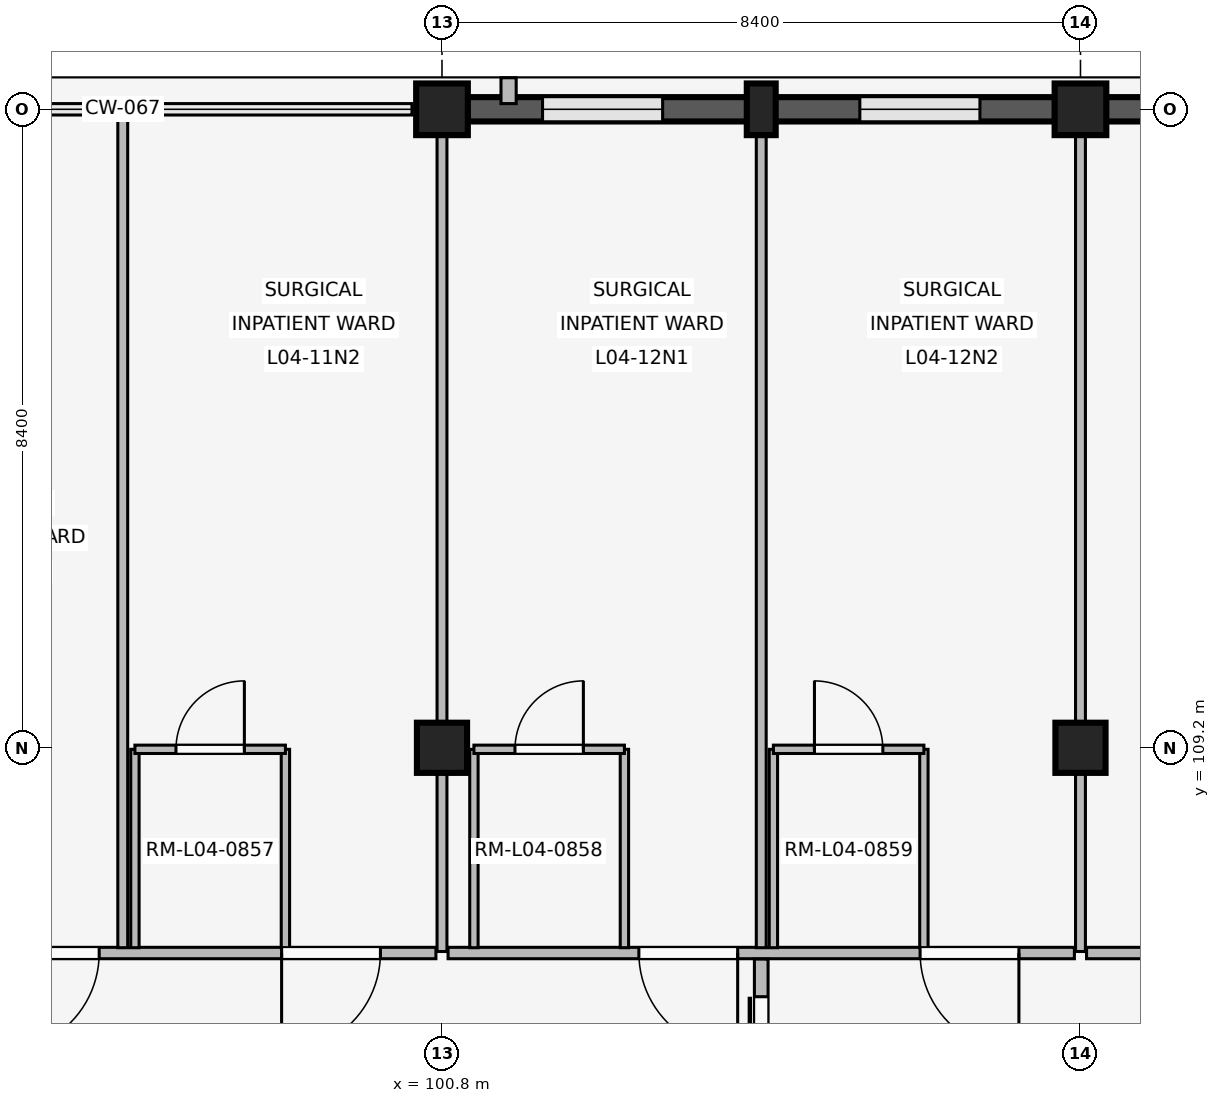
"""IFC4 building model, lengths in metres.
Left out: names, types, materials, properties, quantities, classifications, styles, units other than length and angle.
Written with IfcOpenShell. Run it as: python <this file> out.ifc"""

import sys

from ifc_helpers import new_model, si_unit, direction, frame, frame_2d, origin, origin_2d, place, context, subcontext, project, spatial, rectangle, extrude, element, fill, save


model = new_model("IFC4")
c1 = context("Model", 3, precision=1e-05, world=origin(), true_north=direction((0.0, 1.0)))
c2 = subcontext(c1, "Body", "Model", "MODEL_VIEW")
j1 = project(units=[si_unit("LENGTHUNIT", "METRE"), si_unit("PLANEANGLEUNIT", "RADIAN")], contexts=[c1])
p1 = place(None, origin())
s1 = spatial("IfcSite", under=j1, at=p1, CompositionType="ELEMENT")
p2 = place(p1, origin())
s2 = spatial("IfcBuilding", under=s1, at=p2, CompositionType="ELEMENT")
p3 = place(p2, frame((0.0, 0.0, 16.2)))
s3 = spatial("IfcBuildingStorey", under=s2, at=p3, CompositionType="ELEMENT", Elevation=16.2)
p4 = place(p3, frame((100.8, 109.2, 0.0), z_axis=(0.0, 0.0, 1.0), x_axis=(1.0, 0.0, 0.0)))
e1 = element("IfcColumn", 1, at=p4, inside=s3, PredefinedType="COLUMN", context=c2, shape_type="SweptSolid", body=[
    extrude(rectangle(XDim=0.66, YDim=0.66, at=origin_2d()), origin(), (0.0, 0.0, 1.0), 4.2),
])
p5 = place(p3, frame((100.8, 117.6, 0.0), z_axis=(0.0, 0.0, 1.0), x_axis=(1.0, 0.0, 0.0)))
e2 = element("IfcColumn", 2, at=p5, inside=s3, PredefinedType="COLUMN", context=c2, shape_type="SweptSolid", body=[
    extrude(rectangle(XDim=0.68, YDim=0.68, at=origin_2d()), origin(), (0.0, 0.0, 1.0), 4.2),
])
p6 = place(p3, frame((109.2, 109.2, 0.0), z_axis=(0.0, 0.0, 1.0), x_axis=(1.0, 0.0, 0.0)))
e3 = element("IfcColumn", 3, at=p6, inside=s3, PredefinedType="COLUMN", context=c2, shape_type="SweptSolid", body=[
    extrude(rectangle(XDim=0.66, YDim=0.66, at=origin_2d()), origin(), (0.0, 0.0, 1.0), 4.2),
])
p7 = place(p3, frame((109.2, 117.6, 0.0), z_axis=(0.0, 0.0, 1.0), x_axis=(1.0, 0.0, 0.0)))
e4 = element("IfcColumn", 4, at=p7, inside=s3, PredefinedType="COLUMN", context=c2, shape_type="SweptSolid", body=[
    extrude(rectangle(XDim=0.68, YDim=0.68, at=origin_2d()), origin(), (0.0, 0.0, 1.0), 4.2),
])
p8 = place(p3, frame((105.0, 117.6, 0.0), z_axis=(0.0, 0.0, 1.0), x_axis=(1.0, 0.0, 0.0)))
e5 = element("IfcColumn", 5, at=p8, inside=s3, PredefinedType="PILASTER", context=c2, shape_type="SweptSolid", body=[
    extrude(rectangle(XDim=0.38, YDim=0.68, at=origin_2d()), origin(), (0.0, 0.0, 1.0), 4.2),
])
p9 = place(p3, frame((101.135, 117.6, 0.0), z_axis=(0.0, 0.0, 1.0), x_axis=(1.0, 0.0, 0.0)))
e6 = element("IfcWall", 6, at=p9, inside=s3, PredefinedType="SOLIDWALL", context=c2, shape_type="SweptSolid", body=[
    extrude(rectangle(XDim=7.73, YDim=0.32, at=frame_2d((3.865, 0.0))), origin(), (0.0, 0.0, 1.0), 3.32),
])
p10 = place(p9, frame((0.988, 0.0, 0.85)))
e7 = element("IfcOpeningElement", 7, at=p10, cuts=e6, PredefinedType="OPENING", context=c2, shape_type="SweptSolid", body=[
    extrude(rectangle(XDim=1.58, YDim=1.7, at=frame_2d((0.79, 0.85))), frame((0.0, 0.17, 0.0), z_axis=(0.0, -1.0, 0.0), x_axis=(1.0, 0.0, 0.0)), (0.0, 0.0, 1.0), 0.34),
])
p11 = place(p9, frame((5.162, 0.0, 0.85)))
e8 = element("IfcOpeningElement", 8, at=p11, cuts=e6, PredefinedType="OPENING", context=c2, shape_type="SweptSolid", body=[
    extrude(rectangle(XDim=1.58, YDim=1.7, at=frame_2d((0.79, 0.85))), frame((0.0, 0.17, 0.0), z_axis=(0.0, -1.0, 0.0), x_axis=(1.0, 0.0, 0.0)), (0.0, 0.0, 1.0), 0.34),
])
p12 = place(p3, frame((101.676, 117.675, 0.0), z_axis=(0.0, 0.0, 1.0), x_axis=(0.0, 1.0, 0.0)))
e9 = element("IfcWall", 9, at=p12, inside=s3, PredefinedType="ELEMENTEDWALL", context=c2, shape_type="SweptSolid", body=[
    extrude(rectangle(XDim=0.34, YDim=0.2, at=frame_2d((0.17, 0.0))), origin(), (0.0, 0.0, 1.0), 3.3),
])
p13 = place(p3, frame((109.535, 117.6, 0.0), z_axis=(0.0, 0.0, 1.0), x_axis=(1.0, 0.0, 0.0)))
e10 = element("IfcWall", 10, at=p13, inside=s3, PredefinedType="SOLIDWALL", context=c2, shape_type="SweptSolid", body=[
    extrude(rectangle(XDim=7.73, YDim=0.32, at=frame_2d((3.865, 0.0))), origin(), (0.0, 0.0, 1.0), 3.32),
])
p14 = place(p13, frame((1.038, 0.0, 0.85)))
e11 = element("IfcOpeningElement", 11, at=p14, cuts=e10, PredefinedType="OPENING", context=c2, shape_type="SweptSolid", body=[
    extrude(rectangle(XDim=1.48, YDim=1.6, at=frame_2d((0.74, 0.8))), frame((0.0, 0.17, 0.0), z_axis=(0.0, -1.0, 0.0), x_axis=(1.0, 0.0, 0.0)), (0.0, 0.0, 1.0), 0.34),
])
p15 = place(p13, frame((5.212, 0.0, 0.85)))
e12 = element("IfcOpeningElement", 12, at=p15, cuts=e10, PredefinedType="OPENING", context=c2, shape_type="SweptSolid", body=[
    extrude(rectangle(XDim=1.48, YDim=1.6, at=frame_2d((0.74, 0.8))), frame((0.0, 0.17, 0.0), z_axis=(0.0, -1.0, 0.0), x_axis=(1.0, 0.0, 0.0)), (0.0, 0.0, 1.0), 0.34),
])
p16 = place(p3, frame((100.72, 106.5, 0.0), z_axis=(0.0, 0.0, 1.0), x_axis=(-1.0, 0.0, 0.0)))
e13 = element("IfcWall", 13, at=p16, inside=s3, PredefinedType="PARTITIONING", context=c2, shape_type="SweptSolid", body=[
    extrude(rectangle(XDim=7.96, YDim=0.15, at=frame_2d((3.98, 0.0))), origin(), (0.0, 0.0, 1.0), 3.3),
])
p17 = place(p16, frame((0.73, 0.0, 0.0)))
e14 = element("IfcOpeningElement", 14, at=p17, cuts=e13, PredefinedType="OPENING", context=c2, shape_type="SweptSolid", body=[
    extrude(rectangle(XDim=1.3, YDim=2.25, at=frame_2d((0.65, 1.125))), frame((0.0, 0.085, 0.0), z_axis=(0.0, -1.0, 0.0), x_axis=(1.0, 0.0, 0.0)), (0.0, 0.0, 1.0), 0.17),
])
p18 = place(p16, frame((4.43, 0.0, 0.0)))
e15 = element("IfcOpeningElement", 15, at=p18, cuts=e13, PredefinedType="OPENING", context=c2, shape_type="SweptSolid", body=[
    extrude(rectangle(XDim=1.3, YDim=2.25, at=frame_2d((0.65, 1.125))), frame((0.0, 0.085, 0.0), z_axis=(0.0, -1.0, 0.0), x_axis=(1.0, 0.0, 0.0)), (0.0, 0.0, 1.0), 0.17),
])
p19 = place(p3, frame((96.6, 106.57, 0.0), z_axis=(0.0, 0.0, 1.0), x_axis=(0.0, 1.0, 0.0)))
e16 = element("IfcWall", 16, at=p19, inside=s3, PredefinedType="PARTITIONING", context=c2, shape_type="SweptSolid", body=[
    extrude(rectangle(XDim=10.93, YDim=0.13, at=frame_2d((5.465, 0.0))), origin(), (0.0, 0.0, 1.0), 3.3),
])
for number, where, z_axis, x_axis in (
    (17, (96.76, 106.57, 0.0), (0.0, 0.0, 1.0), (0.0, 1.0, 0.0)),
    (18, (98.74, 106.57, 0.0), (0.0, 0.0, 1.0), (0.0, 1.0, 0.0)),
):
    element("IfcWall", number, at=place(p3, frame(where, z_axis=z_axis, x_axis=x_axis)), inside=s3, PredefinedType="PARTITIONING", context=c2, shape_type="SweptSolid", body=[
        extrude(rectangle(XDim=2.61, YDim=0.11, at=frame_2d((1.305, 0.0))), origin(), (0.0, 0.0, 1.0), 3.3),
    ])
p20 = place(p3, frame((96.76, 109.18, 0.0), z_axis=(0.0, 0.0, 1.0), x_axis=(1.0, 0.0, 0.0)))
e19 = element("IfcWall", 19, at=p20, inside=s3, PredefinedType="PARTITIONING", context=c2, shape_type="SweptSolid", body=[
    extrude(rectangle(XDim=1.98, YDim=0.11, at=frame_2d((0.99, 0.0))), origin(), (0.0, 0.0, 1.0), 3.3),
])
p21 = place(p20, frame((0.54, 0.0, 0.0)))
e20 = element("IfcOpeningElement", 20, at=p21, cuts=e19, PredefinedType="OPENING", context=c2, shape_type="SweptSolid", body=[
    extrude(rectangle(XDim=0.9, YDim=2.1, at=frame_2d((0.45, 1.05))), frame((0.0, 0.065, 0.0), z_axis=(0.0, -1.0, 0.0), x_axis=(1.0, 0.0, 0.0)), (0.0, 0.0, 1.0), 0.13),
])
p22 = place(p3, frame((100.8, 106.52, 0.0), z_axis=(0.0, 0.0, 1.0), x_axis=(0.0, 1.0, 0.0)))
e21 = element("IfcWall", 21, at=p22, inside=s3, PredefinedType="PARTITIONING", context=c2, shape_type="SweptSolid", body=[
    extrude(rectangle(XDim=10.94, YDim=0.13, at=frame_2d((5.47, 0.0))), origin(), (0.0, 0.0, 1.0), 3.3),
])
p23 = place(p3, frame((109.12, 106.5, 0.0), z_axis=(0.0, 0.0, 1.0), x_axis=(-1.0, 0.0, 0.0)))
e22 = element("IfcWall", 22, at=p23, inside=s3, PredefinedType="PARTITIONING", context=c2, shape_type="SweptSolid", body=[
    extrude(rectangle(XDim=8.24, YDim=0.15, at=frame_2d((4.12, 0.0))), origin(), (0.0, 0.0, 1.0), 3.3),
])
p24 = place(p23, frame((0.73, 0.0, 0.0)))
e23 = element("IfcOpeningElement", 23, at=p24, cuts=e22, PredefinedType="OPENING", context=c2, shape_type="SweptSolid", body=[
    extrude(rectangle(XDim=1.3, YDim=2.25, at=frame_2d((0.65, 1.125))), frame((0.0, 0.085, 0.0), z_axis=(0.0, -1.0, 0.0), x_axis=(1.0, 0.0, 0.0)), (0.0, 0.0, 1.0), 0.17),
])
p25 = place(p23, frame((4.43, 0.0, 0.0)))
e24 = element("IfcOpeningElement", 24, at=p25, cuts=e22, PredefinedType="OPENING", context=c2, shape_type="SweptSolid", body=[
    extrude(rectangle(XDim=1.3, YDim=2.25, at=frame_2d((0.65, 1.125))), frame((0.0, 0.085, 0.0), z_axis=(0.0, -1.0, 0.0), x_axis=(1.0, 0.0, 0.0)), (0.0, 0.0, 1.0), 0.17),
])
p26 = place(p3, frame((105.0, 106.57, 0.0), z_axis=(0.0, 0.0, 1.0), x_axis=(0.0, 1.0, 0.0)))
e25 = element("IfcWall", 25, at=p26, inside=s3, PredefinedType="PARTITIONING", context=c2, shape_type="SweptSolid", body=[
    extrude(rectangle(XDim=10.93, YDim=0.13, at=frame_2d((5.465, 0.0))), origin(), (0.0, 0.0, 1.0), 3.3),
])
for number, where, z_axis, x_axis in (
    (26, (101.22, 106.57, 0.0), (0.0, 0.0, 1.0), (0.0, 1.0, 0.0)),
    (27, (103.2, 106.57, 0.0), (0.0, 0.0, 1.0), (0.0, 1.0, 0.0)),
):
    element("IfcWall", number, at=place(p3, frame(where, z_axis=z_axis, x_axis=x_axis)), inside=s3, PredefinedType="PARTITIONING", context=c2, shape_type="SweptSolid", body=[
        extrude(rectangle(XDim=2.61, YDim=0.11, at=frame_2d((1.305, 0.0))), origin(), (0.0, 0.0, 1.0), 3.3),
    ])
p27 = place(p3, frame((101.22, 109.18, 0.0), z_axis=(0.0, 0.0, 1.0), x_axis=(1.0, 0.0, 0.0)))
e28 = element("IfcWall", 28, at=p27, inside=s3, PredefinedType="PARTITIONING", context=c2, shape_type="SweptSolid", body=[
    extrude(rectangle(XDim=1.98, YDim=0.11, at=frame_2d((0.99, 0.0))), origin(), (0.0, 0.0, 1.0), 3.3),
])
p28 = place(p27, frame((0.54, 0.0, 0.0)))
e29 = element("IfcOpeningElement", 29, at=p28, cuts=e28, PredefinedType="OPENING", context=c2, shape_type="SweptSolid", body=[
    extrude(rectangle(XDim=0.9, YDim=2.1, at=frame_2d((0.45, 1.05))), frame((0.0, 0.065, 0.0), z_axis=(0.0, -1.0, 0.0), x_axis=(1.0, 0.0, 0.0)), (0.0, 0.0, 1.0), 0.13),
])
for number, where, z_axis, x_axis in (
    (30, (105.16, 106.57, 0.0), (0.0, 0.0, 1.0), (0.0, 1.0, 0.0)),
    (31, (107.14, 106.57, 0.0), (0.0, 0.0, 1.0), (0.0, 1.0, 0.0)),
):
    element("IfcWall", number, at=place(p3, frame(where, z_axis=z_axis, x_axis=x_axis)), inside=s3, PredefinedType="PARTITIONING", context=c2, shape_type="SweptSolid", body=[
        extrude(rectangle(XDim=2.61, YDim=0.11, at=frame_2d((1.305, 0.0))), origin(), (0.0, 0.0, 1.0), 3.3),
    ])
p29 = place(p3, frame((105.16, 109.18, 0.0), z_axis=(0.0, 0.0, 1.0), x_axis=(1.0, 0.0, 0.0)))
e32 = element("IfcWall", 32, at=p29, inside=s3, PredefinedType="PARTITIONING", context=c2, shape_type="SweptSolid", body=[
    extrude(rectangle(XDim=1.98, YDim=0.11, at=frame_2d((0.99, 0.0))), origin(), (0.0, 0.0, 1.0), 3.3),
])
p30 = place(p29, frame((0.54, 0.0, 0.0)))
e33 = element("IfcOpeningElement", 33, at=p30, cuts=e32, PredefinedType="OPENING", context=c2, shape_type="SweptSolid", body=[
    extrude(rectangle(XDim=0.9, YDim=2.1, at=frame_2d((0.45, 1.05))), frame((0.0, 0.065, 0.0), z_axis=(0.0, -1.0, 0.0), x_axis=(1.0, 0.0, 0.0)), (0.0, 0.0, 1.0), 0.13),
])
p31 = place(p3, frame((105.0, 103.58, 0.0), z_axis=(0.0, 0.0, 1.0), x_axis=(0.0, 1.0, 0.0)))
e34 = element("IfcWall", 34, at=p31, inside=s3, PredefinedType="PARTITIONING", context=c2, shape_type="SweptSolid", body=[
    extrude(rectangle(XDim=2.84, YDim=0.18, at=frame_2d((1.42, 0.0))), origin(), (0.0, 0.0, 1.0), 3.3),
])
p32 = place(p31, frame((0.495, 0.0, 0.0)))
e35 = element("IfcOpeningElement", 35, at=p32, cuts=e34, PredefinedType="OPENING", context=c2, shape_type="SweptSolid", body=[
    extrude(rectangle(XDim=1.85, YDim=2.3, at=frame_2d((0.925, 1.15))), frame((0.0, 0.1, 0.0), z_axis=(0.0, -1.0, 0.0), x_axis=(1.0, 0.0, 0.0)), (0.0, 0.0, 1.0), 0.2),
])
p33 = place(p3, frame((109.2, 106.52, 0.0), z_axis=(0.0, 0.0, 1.0), x_axis=(0.0, 1.0, 0.0)))
e36 = element("IfcWall", 36, at=p33, inside=s3, PredefinedType="PARTITIONING", context=c2, shape_type="SweptSolid", body=[
    extrude(rectangle(XDim=10.94, YDim=0.13, at=frame_2d((5.47, 0.0))), origin(), (0.0, 0.0, 1.0), 3.3),
])
p34 = place(p3, frame((117.52, 106.5, 0.0), z_axis=(0.0, 0.0, 1.0), x_axis=(-1.0, 0.0, 0.0)))
e37 = element("IfcWall", 37, at=p34, inside=s3, PredefinedType="PARTITIONING", context=c2, shape_type="SweptSolid", body=[
    extrude(rectangle(XDim=8.24, YDim=0.15, at=frame_2d((4.12, 0.0))), origin(), (0.0, 0.0, 1.0), 3.3),
])
p35 = place(p34, frame((3.495, 0.0, 0.0)))
e38 = element("IfcOpeningElement", 38, at=p35, cuts=e37, PredefinedType="OPENING", context=c2, shape_type="SweptSolid", body=[
    extrude(rectangle(XDim=1.25, YDim=2.2, at=frame_2d((0.625, 1.1))), frame((0.0, 0.085, 0.0), z_axis=(0.0, -1.0, 0.0), x_axis=(1.0, 0.0, 0.0)), (0.0, 0.0, 1.0), 0.17),
])
p36 = place(p10, origin())
e39 = element("IfcWindow", 39, at=p36, inside=s3, PartitioningType="SINGLE_PANEL", PredefinedType="WINDOW", context=c2, shape_type="SweptSolid", body=[
    extrude(rectangle(XDim=1.58, YDim=1.7, at=frame_2d((0.79, 0.85))), frame((0.0, 0.03, 0.0), z_axis=(0.0, -1.0, 0.0), x_axis=(1.0, 0.0, 0.0)), (0.0, 0.0, 1.0), 0.06),
])
fill(e7, e39)
p37 = place(p11, origin())
e40 = element("IfcWindow", 40, at=p37, inside=s3, PartitioningType="SINGLE_PANEL", PredefinedType="WINDOW", context=c2, shape_type="SweptSolid", body=[
    extrude(rectangle(XDim=1.58, YDim=1.7, at=frame_2d((0.79, 0.85))), frame((0.0, 0.03, 0.0), z_axis=(0.0, -1.0, 0.0), x_axis=(1.0, 0.0, 0.0)), (0.0, 0.0, 1.0), 0.06),
])
fill(e8, e40)
p38 = place(p17, origin())
e41 = element("IfcDoor", 41, at=p38, inside=s3, OperationType="SINGLE_SWING_RIGHT", PredefinedType="DOOR", context=c2, shape_type="SweptSolid", body=[
    extrude(rectangle(XDim=1.3, YDim=2.25, at=frame_2d((0.65, 1.125))), frame((0.0, 0.025, 0.0), z_axis=(0.0, -1.0, 0.0), x_axis=(1.0, 0.0, 0.0)), (0.0, 0.0, 1.0), 0.05),
])
fill(e14, e41)
p39 = place(p18, origin())
e42 = element("IfcDoor", 42, at=p39, inside=s3, OperationType="SINGLE_SWING_RIGHT", PredefinedType="DOOR", context=c2, shape_type="SweptSolid", body=[
    extrude(rectangle(XDim=1.3, YDim=2.25, at=frame_2d((0.65, 1.125))), frame((0.0, 0.025, 0.0), z_axis=(0.0, -1.0, 0.0), x_axis=(1.0, 0.0, 0.0)), (0.0, 0.0, 1.0), 0.05),
])
fill(e15, e42)
p40 = place(p21, origin())
e43 = element("IfcDoor", 43, at=p40, inside=s3, OperationType="SINGLE_SWING_RIGHT", PredefinedType="DOOR", context=c2, shape_type="SweptSolid", body=[
    extrude(rectangle(XDim=0.9, YDim=2.1, at=frame_2d((0.45, 1.05))), frame((0.0, 0.025, 0.0), z_axis=(0.0, -1.0, 0.0), x_axis=(1.0, 0.0, 0.0)), (0.0, 0.0, 1.0), 0.05),
])
fill(e20, e43)
p41 = place(p24, origin())
e44 = element("IfcDoor", 44, at=p41, inside=s3, OperationType="SINGLE_SWING_LEFT", PredefinedType="DOOR", context=c2, shape_type="SweptSolid", body=[
    extrude(rectangle(XDim=1.3, YDim=2.25, at=frame_2d((0.65, 1.125))), frame((0.0, 0.025, 0.0), z_axis=(0.0, -1.0, 0.0), x_axis=(1.0, 0.0, 0.0)), (0.0, 0.0, 1.0), 0.05),
])
fill(e23, e44)
p42 = place(p25, origin())
e45 = element("IfcDoor", 45, at=p42, inside=s3, OperationType="SINGLE_SWING_LEFT", PredefinedType="DOOR", context=c2, shape_type="SweptSolid", body=[
    extrude(rectangle(XDim=1.3, YDim=2.25, at=frame_2d((0.65, 1.125))), frame((0.0, 0.025, 0.0), z_axis=(0.0, -1.0, 0.0), x_axis=(1.0, 0.0, 0.0)), (0.0, 0.0, 1.0), 0.05),
])
fill(e24, e45)
p43 = place(p28, origin())
e46 = element("IfcDoor", 46, at=p43, inside=s3, OperationType="SINGLE_SWING_RIGHT", PredefinedType="DOOR", context=c2, shape_type="SweptSolid", body=[
    extrude(rectangle(XDim=0.9, YDim=2.1, at=frame_2d((0.45, 1.05))), frame((0.0, 0.025, 0.0), z_axis=(0.0, -1.0, 0.0), x_axis=(1.0, 0.0, 0.0)), (0.0, 0.0, 1.0), 0.05),
])
fill(e29, e46)
p44 = place(p30, origin())
e47 = element("IfcDoor", 47, at=p44, inside=s3, OperationType="SINGLE_SWING_LEFT", PredefinedType="DOOR", context=c2, shape_type="SweptSolid", body=[
    extrude(rectangle(XDim=0.9, YDim=2.1, at=frame_2d((0.45, 1.05))), frame((0.0, 0.025, 0.0), z_axis=(0.0, -1.0, 0.0), x_axis=(1.0, 0.0, 0.0)), (0.0, 0.0, 1.0), 0.05),
])
fill(e33, e47)
p45 = place(p32, origin())
e48 = element("IfcDoor", 48, at=p45, inside=s3, OperationType="SLIDING_TO_LEFT", PredefinedType="DOOR", context=c2, shape_type="SweptSolid", body=[
    extrude(rectangle(XDim=1.85, YDim=2.3, at=frame_2d((0.925, 1.15))), frame((0.0, 0.025, 0.0), z_axis=(0.0, -1.0, 0.0), x_axis=(1.0, 0.0, 0.0)), (0.0, 0.0, 1.0), 0.05),
])
fill(e35, e48)
save(model, sys.argv[1])
